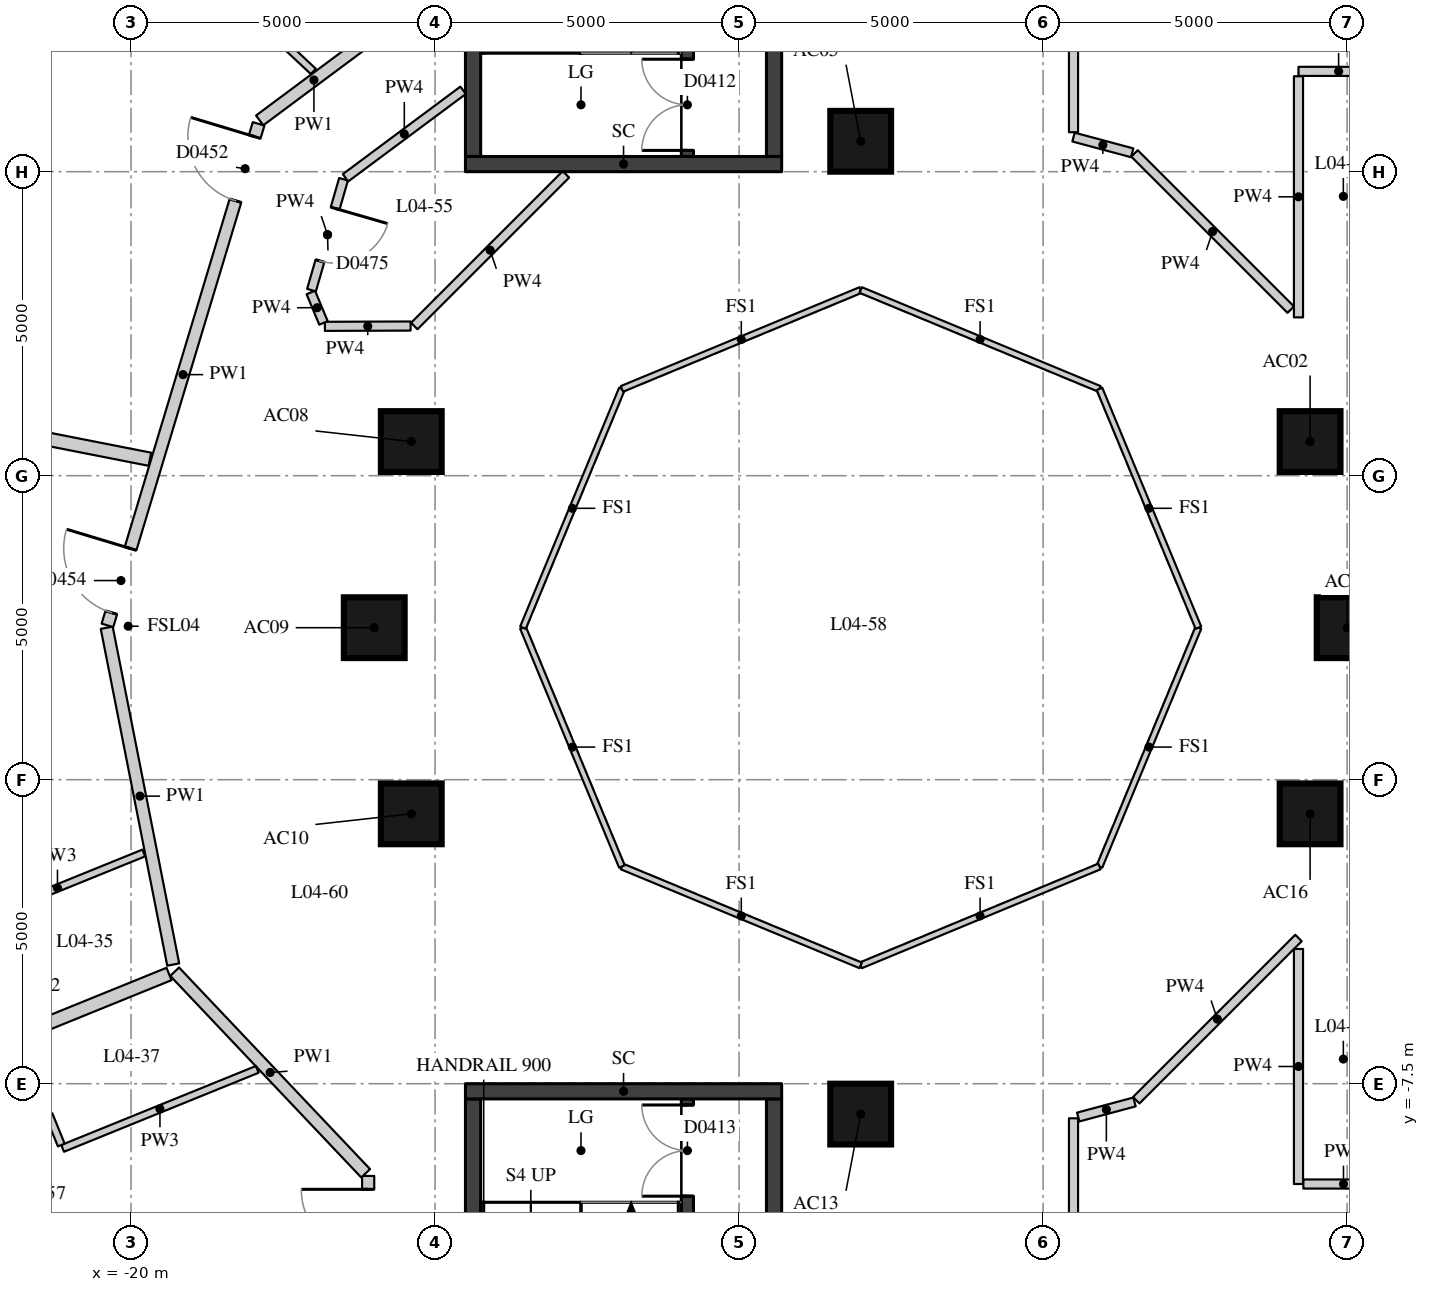
"""IFC4 building model, lengths in metres.
Left out: names, types, materials, properties, quantities, classifications, styles, units other than length and angle.
Written with IfcOpenShell. Run it as: python <this file> out.ifc"""

import sys

from ifc_helpers import new_model, si_unit, direction, frame, frame_2d, origin, origin_2d, place, context, subcontext, project, spatial, rectangle, extrude, element, fill, save


model = new_model("IFC4")
c1 = context("Model", 3, precision=1e-05, world=origin(), true_north=direction((0.0, 1.0)))
c2 = subcontext(c1, "Body", "Model", "MODEL_VIEW")
j1 = project(units=[si_unit("LENGTHUNIT", "METRE"), si_unit("PLANEANGLEUNIT", "RADIAN")], contexts=[c1])
p1 = place(None, origin())
s1 = spatial("IfcSite", under=j1, at=p1, CompositionType="ELEMENT")
p2 = place(p1, origin())
s2 = spatial("IfcBuilding", under=s1, at=p2, CompositionType="ELEMENT")
p3 = place(p2, frame((0.0, 0.0, 21.7)))
s3 = spatial("IfcBuildingStorey", under=s2, at=p3, CompositionType="ELEMENT", Elevation=21.7)
for number, where, z_axis, x_axis in (
    (1, (0.0, 0.0, 0.0), (0.0, 0.0, 1.0), (1.0, 0.0, 0.0)),
    (2, (-0.609, 3.062, 0.0), (0.0, 0.0, 1.0), (1.0, 0.0, 0.0)),
    (3, (-8.0, 8.0, 0.0), (0.0, 0.0, 1.0), (1.0, 0.0, 0.0)),
    (4, (-15.391, 3.062, 0.0), (0.0, 0.0, 1.0), (1.0, 0.0, 0.0)),
    (5, (-16.0, 0.0, 0.0), (0.0, 0.0, 1.0), (1.0, 0.0, 0.0)),
    (6, (-15.391, -3.062, 0.0), (0.0, 0.0, 1.0), (1.0, 0.0, 0.0)),
    (7, (-8.0, -8.0, 0.0), (0.0, 0.0, 1.0), (1.0, 0.0, 0.0)),
    (8, (-0.609, -3.062, 0.0), (0.0, 0.0, 1.0), (1.0, 0.0, 0.0)),
):
    element("IfcColumn", number, at=place(p3, frame(where, z_axis=z_axis, x_axis=x_axis)), inside=s3, PredefinedType="COLUMN", context=c2, shape_type="SweptSolid", body=[
        extrude(rectangle(XDim=1.0, YDim=1.0, at=origin_2d()), origin(), (0.0, 0.0, 1.0), 3.3),
    ])
p4 = place(p3, frame((-10.85, 7.75, 0.0), z_axis=(0.0, 0.0, 1.0), x_axis=(0.0, 1.0, 0.0)))
e9 = element("IfcWall", 9, at=p4, inside=s3, PredefinedType="SHEAR", context=c2, shape_type="SweptSolid", body=[
    extrude(rectangle(XDim=6.0, YDim=0.2, at=frame_2d((3.0, 0.0))), origin(), (0.0, 0.0, 1.0), 3.02),
])
p5 = place(p4, frame((0.1, 0.0, 0.0)))
e10 = element("IfcOpeningElement", 10, at=p5, cuts=e9, PredefinedType="OPENING", context=c2, shape_type="SweptSolid", body=[
    extrude(rectangle(XDim=1.5, YDim=2.1, at=frame_2d((0.75, 1.05))), frame((0.0, 0.11, 0.0), z_axis=(0.0, -1.0, 0.0), x_axis=(1.0, 0.0, 0.0)), (0.0, 0.0, 1.0), 0.22),
])
p6 = place(p3, frame((-10.85, -13.75, 0.0), z_axis=(0.0, 0.0, 1.0), x_axis=(0.0, 1.0, 0.0)))
e11 = element("IfcWall", 11, at=p6, inside=s3, PredefinedType="SHEAR", context=c2, shape_type="SweptSolid", body=[
    extrude(rectangle(XDim=6.0, YDim=0.2, at=frame_2d((3.0, 0.0))), origin(), (0.0, 0.0, 1.0), 3.02),
])
p7 = place(p6, frame((4.4, 0.0, 0.0)))
e12 = element("IfcOpeningElement", 12, at=p7, cuts=e11, PredefinedType="OPENING", context=c2, shape_type="SweptSolid", body=[
    extrude(rectangle(XDim=1.5, YDim=2.1, at=frame_2d((0.75, 1.05))), frame((0.0, 0.11, 0.0), z_axis=(0.0, -1.0, 0.0), x_axis=(1.0, 0.0, 0.0)), (0.0, 0.0, 1.0), 0.22),
])
p8 = place(p3, frame((-14.375, 7.75, -0.28), z_axis=(0.0, 0.0, 1.0), x_axis=(0.0, 1.0, 0.0)))
e13 = element("IfcWall", 13, at=p8, inside=s3, PredefinedType="SHEAR", context=c2, shape_type="SweptSolid", body=[
    extrude(rectangle(XDim=6.0, YDim=0.25, at=frame_2d((3.0, 0.0))), origin(), (0.0, 0.0, 1.0), 3.3),
])
p9 = place(p3, frame((-9.425, 7.75, -0.28), z_axis=(0.0, 0.0, 1.0), x_axis=(0.0, 1.0, 0.0)))
e14 = element("IfcWall", 14, at=p9, inside=s3, PredefinedType="SHEAR", context=c2, shape_type="SweptSolid", body=[
    extrude(rectangle(XDim=6.0, YDim=0.25, at=frame_2d((3.0, 0.0))), origin(), (0.0, 0.0, 1.0), 3.3),
])
p10 = place(p9, frame((2.1, 0.0, 0.28)))
e15 = element("IfcOpeningElement", 15, at=p10, cuts=e14, PredefinedType="OPENING", context=c2, shape_type="SweptSolid", body=[
    extrude(rectangle(XDim=1.5, YDim=2.1, at=frame_2d((0.75, 1.05))), frame((0.0, 0.135, 0.0), z_axis=(0.0, -1.0, 0.0), x_axis=(1.0, 0.0, 0.0)), (0.0, 0.0, 1.0), 0.27),
])
p11 = place(p3, frame((-14.5, 7.625, -0.28), z_axis=(0.0, 0.0, 1.0), x_axis=(1.0, 0.0, 0.0)))
e16 = element("IfcWall", 16, at=p11, inside=s3, PredefinedType="SHEAR", context=c2, shape_type="SweptSolid", body=[
    extrude(rectangle(XDim=5.2, YDim=0.25, at=frame_2d((2.6, 0.0))), origin(), (0.0, 0.0, 1.0), 3.3),
])
p12 = place(p3, frame((-14.375, -13.75, -0.28), z_axis=(0.0, 0.0, 1.0), x_axis=(0.0, 1.0, 0.0)))
e17 = element("IfcWall", 17, at=p12, inside=s3, PredefinedType="SHEAR", context=c2, shape_type="SweptSolid", body=[
    extrude(rectangle(XDim=6.0, YDim=0.25, at=frame_2d((3.0, 0.0))), origin(), (0.0, 0.0, 1.0), 3.3),
])
p13 = place(p3, frame((-9.425, -13.75, -0.28), z_axis=(0.0, 0.0, 1.0), x_axis=(0.0, 1.0, 0.0)))
e18 = element("IfcWall", 18, at=p13, inside=s3, PredefinedType="SHEAR", context=c2, shape_type="SweptSolid", body=[
    extrude(rectangle(XDim=6.0, YDim=0.25, at=frame_2d((3.0, 0.0))), origin(), (0.0, 0.0, 1.0), 3.3),
])
p14 = place(p13, frame((2.4, 0.0, 0.28)))
e19 = element("IfcOpeningElement", 19, at=p14, cuts=e18, PredefinedType="OPENING", context=c2, shape_type="SweptSolid", body=[
    extrude(rectangle(XDim=1.5, YDim=2.1, at=frame_2d((0.75, 1.05))), frame((0.0, 0.135, 0.0), z_axis=(0.0, -1.0, 0.0), x_axis=(1.0, 0.0, 0.0)), (0.0, 0.0, 1.0), 0.27),
])
p15 = place(p3, frame((-14.5, -7.625, -0.28), z_axis=(0.0, 0.0, 1.0), x_axis=(1.0, 0.0, 0.0)))
e20 = element("IfcWall", 20, at=p15, inside=s3, PredefinedType="SHEAR", context=c2, shape_type="SweptSolid", body=[
    extrude(rectangle(XDim=5.2, YDim=0.25, at=frame_2d((2.6, 0.0))), origin(), (0.0, 0.0, 1.0), 3.3),
])
p16 = place(p3, frame((-17.884, 8.344, 0.0), z_axis=(0.0, 0.0, 1.0), x_axis=(0.802260120548, 0.596974621721, 0.0)))
e21 = element("IfcWall", 21, at=p16, inside=s3, PredefinedType="PARTITIONING", context=c2, shape_type="SweptSolid", body=[
    extrude(rectangle(XDim=2.224, YDim=0.2, at=frame_2d((1.112, 0.0))), origin(), (0.0, 0.0, 1.0), 3.02),
])
p17 = place(p3, frame((-16.1, -15.064, 0.0), z_axis=(0.0, 0.0, 1.0), x_axis=(0.0, 1.0, 0.0)))
e22 = element("IfcWall", 22, at=p17, inside=s3, PredefinedType="PARTITIONING", context=c2, shape_type="SweptSolid", body=[
    extrude(rectangle(XDim=6.047, YDim=0.2, at=frame_2d((3.023, 0.0))), origin(), (0.0, 0.0, 1.0), 3.02),
])
p18 = place(p17, frame((4.727, 0.0, 0.0)))
e23 = element("IfcOpeningElement", 23, at=p18, cuts=e22, PredefinedType="OPENING", context=c2, shape_type="SweptSolid", body=[
    extrude(rectangle(XDim=1.1, YDim=2.1, at=frame_2d((0.55, 1.05))), frame((0.0, 0.11, 0.0), z_axis=(0.0, -1.0, 0.0), x_axis=(1.0, 0.0, 0.0)), (0.0, 0.0, 1.0), 0.22),
])
p19 = place(p17, frame((1.467, 0.0, 0.0)))
e24 = element("IfcOpeningElement", 24, at=p19, cuts=e22, PredefinedType="OPENING", context=c2, shape_type="SweptSolid", body=[
    extrude(rectangle(XDim=1.1, YDim=2.1, at=frame_2d((0.55, 1.05))), frame((0.0, 0.11, 0.0), z_axis=(0.0, -1.0, 0.0), x_axis=(1.0, 0.0, 0.0)), (0.0, 0.0, 1.0), 0.22),
])
p20 = place(p3, frame((-16.141, -8.974, 0.0), z_axis=(0.0, 0.0, 1.0), x_axis=(-0.687741683024, 0.725955492735, 0.0)))
e25 = element("IfcWall", 25, at=p20, inside=s3, PredefinedType="PARTITIONING", context=c2, shape_type="SweptSolid", body=[
    extrude(rectangle(XDim=4.568, YDim=0.2, at=frame_2d((2.284, 0.0))), origin(), (0.0, 0.0, 1.0), 3.02),
])
p21 = place(p3, frame((-19.306, -5.541, 0.0), z_axis=(0.0, 0.0, 1.0), x_axis=(-0.193671356151, 0.981066463501, 0.0)))
e26 = element("IfcWall", 26, at=p21, inside=s3, PredefinedType="PARTITIONING", context=c2, shape_type="SweptSolid", body=[
    extrude(rectangle(XDim=5.647, YDim=0.2, at=frame_2d((2.824, 0.0))), origin(), (0.0, 0.0, 1.0), 3.02),
])
p22 = place(p3, frame((-20.388, 0.038, 0.0), z_axis=(0.0, 0.0, 1.0), x_axis=(0.288600779805, 0.957449523419, 0.0)))
e27 = element("IfcWall", 27, at=p22, inside=s3, PredefinedType="PARTITIONING", context=c2, shape_type="SweptSolid", body=[
    extrude(rectangle(XDim=8.615, YDim=0.2, at=frame_2d((4.308, 0.0))), origin(), (0.0, 0.0, 1.0), 3.02),
])
p23 = place(p22, frame((7.295, 0.0, 0.0)))
e28 = element("IfcOpeningElement", 28, at=p23, cuts=e27, PredefinedType="OPENING", context=c2, shape_type="SweptSolid", body=[
    extrude(rectangle(XDim=1.1, YDim=2.1, at=frame_2d((0.55, 1.05))), frame((0.0, 0.11, 0.0), z_axis=(0.0, -1.0, 0.0), x_axis=(1.0, 0.0, 0.0)), (0.0, 0.0, 1.0), 0.22),
])
p24 = place(p22, frame((0.22, 0.0, 0.0)))
e29 = element("IfcOpeningElement", 29, at=p24, cuts=e27, PredefinedType="OPENING", context=c2, shape_type="SweptSolid", body=[
    extrude(rectangle(XDim=1.1, YDim=2.1, at=frame_2d((0.55, 1.05))), frame((0.0, 0.11, 0.0), z_axis=(0.0, -1.0, 0.0), x_axis=(1.0, 0.0, 0.0)), (0.0, 0.0, 1.0), 0.22),
])
p25 = place(p3, frame((0.52, 9.15, 0.0), z_axis=(0.0, 0.0, 1.0), x_axis=(-1.0, 0.0, 0.0)))
e30 = element("IfcWall", 30, at=p25, inside=s3, PredefinedType="PARTITIONING", context=c2, shape_type="SweptSolid", body=[
    extrude(rectangle(XDim=1.32, YDim=0.15, at=frame_2d((0.66, 0.0))), origin(), (0.0, 0.0, 1.0), 3.02),
])
p26 = place(p3, frame((-0.8, 9.07, 0.0), z_axis=(0.0, 0.0, 1.0), x_axis=(0.0, -1.0, 0.0)))
e31 = element("IfcWall", 31, at=p26, inside=s3, PredefinedType="PARTITIONING", context=c2, shape_type="SweptSolid", body=[
    extrude(rectangle(XDim=3.966, YDim=0.15, at=frame_2d((1.983, 0.0))), origin(), (0.0, 0.0, 1.0), 3.02),
])
p27 = place(p3, frame((-0.927, 5.231, 0.0), z_axis=(0.0, 0.0, 1.0), x_axis=(-0.707106781187, 0.707106781187, 0.0)))
e32 = element("IfcWall", 32, at=p27, inside=s3, PredefinedType="PARTITIONING", context=c2, shape_type="SweptSolid", body=[
    extrude(rectangle(XDim=3.633, YDim=0.15, at=frame_2d((1.817, 0.0))), origin(), (0.0, 0.0, 1.0), 3.02),
])
p28 = place(p3, frame((-3.535, 7.811, 0.0), z_axis=(0.0, 0.0, 1.0), x_axis=(-0.965921867197, 0.258833820183, 0.0)))
e33 = element("IfcWall", 33, at=p28, inside=s3, PredefinedType="PARTITIONING", context=c2, shape_type="SweptSolid", body=[
    extrude(rectangle(XDim=0.999, YDim=0.15, at=frame_2d((0.5, 0.0))), origin(), (0.0, 0.0, 1.0), 3.02),
])
p29 = place(p3, frame((-4.5, 8.149, 0.0), z_axis=(0.0, 0.0, 1.0), x_axis=(0.0, 1.0, 0.0)))
e34 = element("IfcWall", 34, at=p29, inside=s3, PredefinedType="PARTITIONING", context=c2, shape_type="SweptSolid", body=[
    extrude(rectangle(XDim=3.601, YDim=0.15, at=frame_2d((1.8, 0.0))), origin(), (0.0, 0.0, 1.0), 3.02),
])
p30 = place(p3, frame((-12.847, 7.456, 0.0), z_axis=(0.0, 0.0, 1.0), x_axis=(-0.707072180997, -0.707141379683, 0.0)))
e35 = element("IfcWall", 35, at=p30, inside=s3, PredefinedType="PARTITIONING", context=c2, shape_type="SweptSolid", body=[
    extrude(rectangle(XDim=3.528, YDim=0.15, at=frame_2d((1.764, 0.0))), origin(), (0.0, 0.0, 1.0), 3.02),
])
p31 = place(p3, frame((-15.402, 4.961, 0.0), z_axis=(0.0, 0.0, 1.0), x_axis=(-0.999994001087, -0.003463782477, 0.0)))
e36 = element("IfcWall", 36, at=p31, inside=s3, PredefinedType="PARTITIONING", context=c2, shape_type="SweptSolid", body=[
    extrude(rectangle(XDim=1.41, YDim=0.15, at=frame_2d((0.705, 0.0))), origin(), (0.0, 0.0, 1.0), 3.02),
])
p32 = place(p3, frame((-16.834, 5.012, 0.0), z_axis=(0.0, 0.0, 1.0), x_axis=(-0.384455737739, 0.923143426408, 0.0)))
e37 = element("IfcWall", 37, at=p32, inside=s3, PredefinedType="PARTITIONING", context=c2, shape_type="SweptSolid", body=[
    extrude(rectangle(XDim=0.543, YDim=0.15, at=frame_2d((0.271, 0.0))), origin(), (0.0, 0.0, 1.0), 3.02),
])
p33 = place(p3, frame((-17.032, 5.552, 0.0), z_axis=(0.0, 0.0, 1.0), x_axis=(0.277658349549, 0.96067988473, 0.0)))
e38 = element("IfcWall", 38, at=p33, inside=s3, PredefinedType="PARTITIONING", context=c2, shape_type="SweptSolid", body=[
    extrude(rectangle(XDim=1.898, YDim=0.15, at=frame_2d((0.949, 0.0))), origin(), (0.0, 0.0, 1.0), 3.02),
])
p34 = place(p33, frame((0.499, 0.0, 0.0)))
e39 = element("IfcOpeningElement", 39, at=p34, cuts=e38, PredefinedType="OPENING", context=c2, shape_type="SweptSolid", body=[
    extrude(rectangle(XDim=0.9, YDim=2.1, at=frame_2d((0.45, 1.05))), frame((0.0, 0.085, 0.0), z_axis=(0.0, -1.0, 0.0), x_axis=(1.0, 0.0, 0.0)), (0.0, 0.0, 1.0), 0.17),
])
p35 = place(p3, frame((-16.473, 7.4, 0.0), z_axis=(0.0, 0.0, 1.0), x_axis=(0.802267063429, 0.596965291233, 0.0)))
e40 = element("IfcWall", 40, at=p35, inside=s3, PredefinedType="PARTITIONING", context=c2, shape_type="SweptSolid", body=[
    extrude(rectangle(XDim=2.41, YDim=0.15, at=frame_2d((1.205, 0.0))), origin(), (0.0, 0.0, 1.0), 3.02),
])
p36 = place(p3, frame((-4.5, -11.67, 0.0), z_axis=(0.0, 0.0, 1.0), x_axis=(0.0, 1.0, 0.0)))
e41 = element("IfcWall", 41, at=p36, inside=s3, PredefinedType="PARTITIONING", context=c2, shape_type="SweptSolid", body=[
    extrude(rectangle(XDim=3.601, YDim=0.15, at=frame_2d((1.8, 0.0))), origin(), (0.0, 0.0, 1.0), 3.02),
])
p37 = place(p3, frame((-4.423, -8.049, 0.0), z_axis=(0.0, 0.0, 1.0), x_axis=(0.96590031435, 0.25891423819, 0.0)))
e42 = element("IfcWall", 42, at=p37, inside=s3, PredefinedType="PARTITIONING", context=c2, shape_type="SweptSolid", body=[
    extrude(rectangle(XDim=0.959, YDim=0.15, at=frame_2d((0.479, 0.0))), origin(), (0.0, 0.0, 1.0), 3.02),
])
p38 = place(p3, frame((-3.468, -7.772, 0.0), z_axis=(0.0, 0.0, 1.0), x_axis=(0.707106781187, 0.707106781187, 0.0)))
e43 = element("IfcWall", 43, at=p38, inside=s3, PredefinedType="PARTITIONING", context=c2, shape_type="SweptSolid", body=[
    extrude(rectangle(XDim=3.773, YDim=0.15, at=frame_2d((1.887, 0.0))), origin(), (0.0, 0.0, 1.0), 3.02),
])
p39 = place(p3, frame((-0.8, -5.284, 0.0), z_axis=(0.0, 0.0, 1.0), x_axis=(0.0, -1.0, 0.0)))
e44 = element("IfcWall", 44, at=p39, inside=s3, PredefinedType="PARTITIONING", context=c2, shape_type="SweptSolid", body=[
    extrude(rectangle(XDim=3.866, YDim=0.15, at=frame_2d((1.933, 0.0))), origin(), (0.0, 0.0, 1.0), 3.02),
])
p40 = place(p3, frame((-0.72, -9.15, 0.0), z_axis=(0.0, 0.0, 1.0), x_axis=(1.0, 0.0, 0.0)))
e45 = element("IfcWall", 45, at=p40, inside=s3, PredefinedType="PARTITIONING", context=c2, shape_type="SweptSolid", body=[
    extrude(rectangle(XDim=1.32, YDim=0.15, at=frame_2d((0.66, 0.0))), origin(), (0.0, 0.0, 1.0), 3.02),
])
p41 = place(p3, frame((-25.761, 3.964, 0.0), z_axis=(0.0, 0.0, 1.0), x_axis=(0.981209888948, -0.192943395406, 0.0)))
e46 = element("IfcWall", 46, at=p41, inside=s3, PredefinedType="PARTITIONING", context=c2, shape_type="SweptSolid", body=[
    extrude(rectangle(XDim=6.188, YDim=0.22, at=frame_2d((3.094, 0.0))), origin(), (0.0, 0.0, 1.0), 2.47),
])
p42 = place(p3, frame((-24.608, -7.82, 0.0), z_axis=(0.0, 0.0, 1.0), x_axis=(0.926565467624, 0.376133532415, 0.0)))
e47 = element("IfcWall", 47, at=p42, inside=s3, PredefinedType="PARTITIONING", context=c2, shape_type="SweptSolid", body=[
    extrude(rectangle(XDim=5.648, YDim=0.22, at=frame_2d((2.824, 0.0))), origin(), (0.0, 0.0, 1.0), 3.02),
])
p43 = place(p3, frame((-17.002, 9.149, 0.0), z_axis=(0.0, 0.0, 1.0), x_axis=(-0.730093035944, 0.683347758368, 0.0)))
e48 = element("IfcWall", 48, at=p43, inside=s3, PredefinedType="PARTITIONING", context=c2, shape_type="SweptSolid", body=[
    extrude(rectangle(XDim=3.437, YDim=0.12, at=frame_2d((1.718, 0.0))), origin(), (0.0, 0.0, 1.0), 3.02),
])
p44 = place(p3, frame((-19.79, -3.705, 0.0), z_axis=(0.0, 0.0, 1.0), x_axis=(-0.926585481443, -0.37608422671, 0.0)))
e49 = element("IfcWall", 49, at=p44, inside=s3, PredefinedType="PARTITIONING", context=c2, shape_type="SweptSolid", body=[
    extrude(rectangle(XDim=3.064, YDim=0.12, at=frame_2d((1.532, 0.0))), origin(), (0.0, 0.0, 1.0), 3.02),
])
p45 = place(p3, frame((-17.924, -7.264, 0.0), z_axis=(0.0, 0.0, 1.0), x_axis=(-0.926548953408, -0.376174210891, 0.0)))
e50 = element("IfcWall", 50, at=p45, inside=s3, PredefinedType="PARTITIONING", context=c2, shape_type="SweptSolid", body=[
    extrude(rectangle(XDim=3.455, YDim=0.12, at=frame_2d((1.727, 0.0))), origin(), (0.0, 0.0, 1.0), 3.02),
])
p46 = place(p3, frame((-21.147, -8.508, 0.0), z_axis=(0.0, 0.0, 1.0), x_axis=(-0.376216010002, 0.92653198208, 0.0)))
e51 = element("IfcWall", 51, at=p46, inside=s3, PredefinedType="PARTITIONING", context=c2, shape_type="SweptSolid", body=[
    extrude(rectangle(XDim=1.83, YDim=0.12, at=frame_2d((0.915, 0.0))), origin(), (0.0, 0.0, 1.0), 3.02),
])
p47 = place(p46, frame((0.54, 0.0, 0.0)))
e52 = element("IfcOpeningElement", 52, at=p47, cuts=e51, PredefinedType="OPENING", context=c2, shape_type="SweptSolid", body=[
    extrude(rectangle(XDim=0.8, YDim=2.1, at=frame_2d((0.4, 1.05))), frame((0.0, 0.07, 0.0), z_axis=(0.0, -1.0, 0.0), x_axis=(1.0, 0.0, 0.0)), (0.0, 0.0, 1.0), 0.14),
])
for number, where, z_axis, x_axis in (
    (53, (-2.446, 0.0, 0.0), (0.0, 0.0, 1.0), (-0.383, -0.924, 0.0)),
    (54, (-4.073, -3.927, 0.0), (0.0, 0.0, 1.0), (-0.924, -0.383, 0.0)),
    (55, (-8.0, -5.554, 0.0), (0.0, 0.0, 1.0), (-0.924, 0.383, 0.0)),
    (56, (-11.927, -3.927, 0.0), (0.0, 0.0, 1.0), (-0.383, 0.924, 0.0)),
    (57, (-13.554, 0.0, 0.0), (0.0, 0.0, 1.0), (0.383, 0.924, 0.0)),
    (58, (-11.927, 3.927, 0.0), (0.0, 0.0, 1.0), (0.924, 0.383, 0.0)),
    (59, (-8.0, 5.554, 0.0), (0.0, 0.0, 1.0), (0.924, -0.383, 0.0)),
    (60, (-4.073, 3.927, 0.0), (0.0, 0.0, 1.0), (0.383, -0.924, 0.0)),
):
    element("IfcWall", number, at=place(p3, frame(where, z_axis=z_axis, x_axis=x_axis)), inside=s3, PredefinedType="PARTITIONING", context=c2, shape_type="SweptSolid", body=[
        extrude(rectangle(XDim=4.251, YDim=0.1, at=frame_2d((2.125, 0.0))), origin(), (0.0, 0.0, 1.0), 3.02),
    ])
p48 = place(p5, origin())
e61 = element("IfcDoor", 61, at=p48, inside=s3, OperationType="DOUBLE_DOOR_SINGLE_SWING", PredefinedType="DOOR", context=c2, shape_type="SweptSolid", body=[
    extrude(rectangle(XDim=1.5, YDim=2.1, at=frame_2d((0.75, 1.05))), frame((0.0, 0.025, 0.0), z_axis=(0.0, -1.0, 0.0), x_axis=(1.0, 0.0, 0.0)), (0.0, 0.0, 1.0), 0.05),
])
fill(e10, e61)
p49 = place(p7, origin())
e62 = element("IfcDoor", 62, at=p49, inside=s3, OperationType="DOUBLE_DOOR_SINGLE_SWING", PredefinedType="DOOR", context=c2, shape_type="SweptSolid", body=[
    extrude(rectangle(XDim=1.5, YDim=2.1, at=frame_2d((0.75, 1.05))), frame((0.0, 0.025, 0.0), z_axis=(0.0, -1.0, 0.0), x_axis=(1.0, 0.0, 0.0)), (0.0, 0.0, 1.0), 0.05),
])
fill(e12, e62)
p50 = place(p23, origin())
e63 = element("IfcDoor", 63, at=p50, inside=s3, OperationType="SINGLE_SWING_RIGHT", PredefinedType="DOOR", context=c2, shape_type="SweptSolid", body=[
    extrude(rectangle(XDim=1.1, YDim=2.1, at=frame_2d((0.55, 1.05))), frame((0.0, 0.025, 0.0), z_axis=(0.0, -1.0, 0.0), x_axis=(1.0, 0.0, 0.0)), (0.0, 0.0, 1.0), 0.05),
])
fill(e28, e63)
p51 = place(p24, origin())
e64 = element("IfcDoor", 64, at=p51, inside=s3, OperationType="SINGLE_SWING_RIGHT", PredefinedType="DOOR", context=c2, shape_type="SweptSolid", body=[
    extrude(rectangle(XDim=1.1, YDim=2.1, at=frame_2d((0.55, 1.05))), frame((0.0, 0.025, 0.0), z_axis=(0.0, -1.0, 0.0), x_axis=(1.0, 0.0, 0.0)), (0.0, 0.0, 1.0), 0.05),
])
fill(e29, e64)
p52 = place(p18, origin())
e65 = element("IfcDoor", 65, at=p52, inside=s3, OperationType="SINGLE_SWING_RIGHT", PredefinedType="DOOR", context=c2, shape_type="SweptSolid", body=[
    extrude(rectangle(XDim=1.1, YDim=2.1, at=frame_2d((0.55, 1.05))), frame((0.0, 0.025, 0.0), z_axis=(0.0, -1.0, 0.0), x_axis=(1.0, 0.0, 0.0)), (0.0, 0.0, 1.0), 0.05),
])
fill(e23, e65)
p53 = place(p34, origin())
e66 = element("IfcDoor", 66, at=p53, inside=s3, OperationType="SINGLE_SWING_LEFT", PredefinedType="DOOR", context=c2, shape_type="SweptSolid", body=[
    extrude(rectangle(XDim=0.9, YDim=2.1, at=frame_2d((0.45, 1.05))), frame((0.0, 0.025, 0.0), z_axis=(0.0, -1.0, 0.0), x_axis=(1.0, 0.0, 0.0)), (0.0, 0.0, 1.0), 0.05),
])
fill(e39, e66)
save(model, sys.argv[1])
